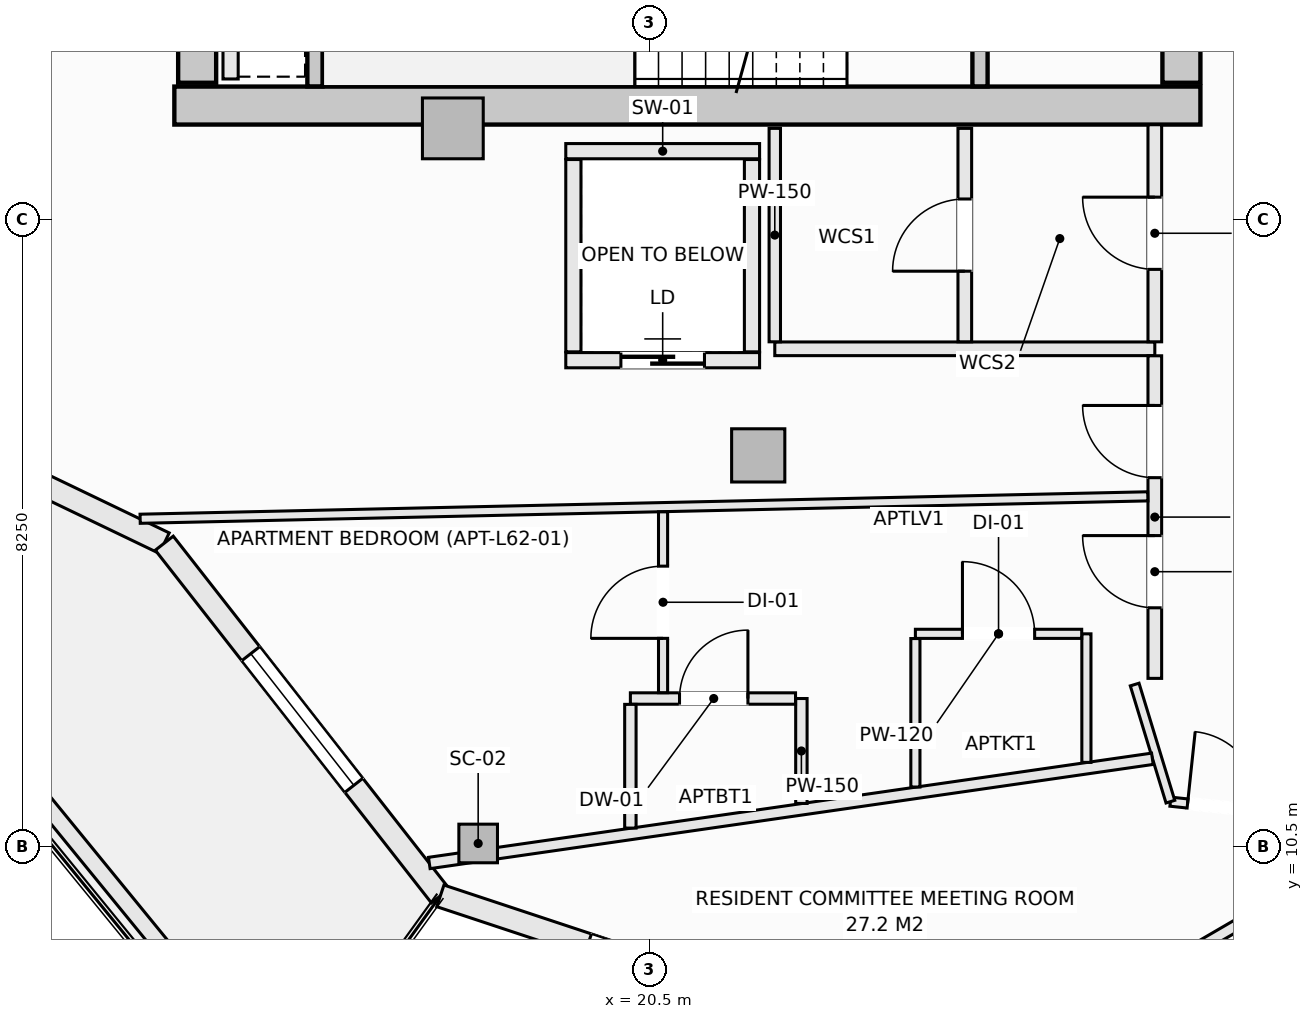
"""IFC4 building model, lengths in metres.
Left out: names, types, materials, properties, quantities, classifications, styles, units other than length and angle.
Written with IfcOpenShell. Run it as: python <this file> out.ifc"""

import sys

from ifc_helpers import new_model, si_unit, direction, frame, frame_2d, origin, origin_2d, place, context, subcontext, project, spatial, rectangle, hollow_rectangle, extrude, element, fill, save


model = new_model("IFC4")
c1 = context("Model", 3, precision=1e-05, world=origin(), true_north=direction((0.0, 1.0)))
c2 = subcontext(c1, "Body", "Model", "MODEL_VIEW")
j1 = project(units=[si_unit("LENGTHUNIT", "METRE"), si_unit("PLANEANGLEUNIT", "RADIAN")], contexts=[c1])
p1 = place(None, origin())
s1 = spatial("IfcSite", under=j1, at=p1, CompositionType="ELEMENT")
p2 = place(p1, origin())
s2 = spatial("IfcBuilding", under=s1, at=p2, CompositionType="ELEMENT")
p3 = place(p2, frame((0.0, 0.0, 232.7)))
s3 = spatial("IfcBuildingStorey", under=s2, at=p3, CompositionType="ELEMENT", Elevation=232.7)
p4 = place(p3, frame((14.25, 20.25, -0.27), z_axis=(0.0, 0.0, 1.0), x_axis=(1.0, 0.0, 0.0)))
e1 = element("IfcWall", 1, at=p4, inside=s3, PredefinedType="SHEAR", context=c2, shape_type="SweptSolid", body=[
    extrude(rectangle(XDim=13.5, YDim=0.5, at=frame_2d((6.75, 0.0))), origin(), (0.0, 0.0, 1.0), 3.3),
])
p5 = place(p3, frame((14.55, 20.55, -0.27), z_axis=(0.0, 0.0, 1.0), x_axis=(0.0, 1.0, 0.0)))
e2 = element("IfcWall", 2, at=p5, inside=s3, PredefinedType="SHEAR", context=c2, shape_type="SweptSolid", body=[
    extrude(rectangle(XDim=12.9, YDim=0.5, at=frame_2d((6.45, 0.0))), origin(), (0.0, 0.0, 1.0), 3.3),
])
p6 = place(p3, frame((27.5, 20.55, -0.27), z_axis=(0.0, 0.0, 1.0), x_axis=(0.0, 1.0, 0.0)))
e3 = element("IfcWall", 3, at=p6, inside=s3, PredefinedType="SHEAR", context=c2, shape_type="SweptSolid", body=[
    extrude(rectangle(XDim=1.5, YDim=0.5, at=frame_2d((0.75, 0.0))), origin(), (0.0, 0.0, 1.0), 3.3),
])
p7 = place(p3, frame((18.247, 10.542, -0.27), z_axis=(0.0, 0.0, 1.0), x_axis=(1.0, 0.0, 0.0)))
e4 = element("IfcColumn", 4, at=p7, inside=s3, PredefinedType="COLUMN", context=c2, shape_type="SweptSolid", body=[
    extrude(hollow_rectangle(XDim=0.508, YDim=0.508, WallThickness=0.019, at=origin_2d()), origin(), (0.0, 0.0, 1.0), 3.3),
])
p8 = place(p3, frame((21.932, 15.648, -0.27), z_axis=(0.0, 0.0, 1.0), x_axis=(1.0, 0.0, 0.0)))
e5 = element("IfcColumn", 5, at=p8, inside=s3, PredefinedType="COLUMN", context=c2, shape_type="SweptSolid", body=[
    extrude(rectangle(XDim=0.7, YDim=0.7, at=origin_2d()), origin(), (0.0, 0.0, 1.0), 3.3),
])
p9 = place(p3, frame((17.914, 19.95, -0.27), z_axis=(0.0, 0.0, 1.0), x_axis=(1.0, 0.0, 0.0)))
e6 = element("IfcColumn", 6, at=p9, inside=s3, PredefinedType="PILASTER", context=c2, shape_type="SweptSolid", body=[
    extrude(rectangle(XDim=0.8, YDim=0.8, at=origin_2d()), origin(), (0.0, 0.0, 1.0), 3.3),
])
p10 = place(p3, frame((8.691, 17.1, 0.0), z_axis=(0.0, 0.0, 1.0), x_axis=(0.901348331142, -0.433094892545, 0.0)))
e7 = element("IfcWall", 7, at=p10, inside=s3, PredefinedType="SOLIDWALL", context=c2, shape_type="SweptSolid", body=[
    extrude(rectangle(XDim=6.021, YDim=0.3, at=frame_2d((3.01, 0.0))), origin(), (0.0, 0.0, 1.0), 2.605),
])
p11 = place(p10, frame((2.11, 0.0, 0.0)))
e8 = element("IfcOpeningElement", 8, at=p11, cuts=e7, PredefinedType="OPENING", context=c2, shape_type="SweptSolid", body=[
    extrude(rectangle(XDim=1.8, YDim=2.25, at=frame_2d((0.9, 1.125))), frame((0.0, 0.16, 0.0), z_axis=(0.0, -1.0, 0.0), x_axis=(1.0, 0.0, 0.0)), (0.0, 0.0, 1.0), 0.32),
])
p12 = place(p3, frame((14.117, 14.493, 0.0), z_axis=(0.0, 0.0, 1.0), x_axis=(0.616450126935, -0.787393955401, 0.0)))
e9 = element("IfcWall", 9, at=p12, inside=s3, PredefinedType="SOLIDWALL", context=c2, shape_type="SweptSolid", body=[
    extrude(rectangle(XDim=5.893, YDim=0.3, at=frame_2d((2.946, 0.0))), origin(), (0.0, 0.0, 1.0), 2.605),
])
p13 = place(p12, frame((1.846, 0.0, 0.72)))
e10 = element("IfcOpeningElement", 10, at=p13, cuts=e9, PredefinedType="OPENING", context=c2, shape_type="SweptSolid", body=[
    extrude(rectangle(XDim=2.2, YDim=1.65, at=frame_2d((1.1, 0.825))), frame((0.0, 0.16, 0.0), z_axis=(0.0, -1.0, 0.0), x_axis=(1.0, 0.0, 0.0)), (0.0, 0.0, 1.0), 0.32),
])
p14 = place(p3, frame((17.75, 9.853, 0.0), z_axis=(0.0, 0.0, 1.0), x_axis=(0.949240877604, -0.314550085495, 0.0)))
e11 = element("IfcWall", 11, at=p14, inside=s3, PredefinedType="SOLIDWALL", context=c2, shape_type="SweptSolid", body=[
    extrude(rectangle(XDim=6.288, YDim=0.3, at=frame_2d((3.144, 0.0))), origin(), (0.0, 0.0, 1.0), 2.605),
])
p15 = place(p14, frame((2.044, 0.0, 0.72)))
e12 = element("IfcOpeningElement", 12, at=p15, cuts=e11, PredefinedType="OPENING", context=c2, shape_type="SweptSolid", body=[
    extrude(rectangle(XDim=2.2, YDim=1.65, at=frame_2d((1.1, 0.825))), frame((0.0, 0.16, 0.0), z_axis=(0.0, -1.0, 0.0), x_axis=(1.0, 0.0, 0.0)), (0.0, 0.0, 1.0), 0.32),
])
p16 = place(p3, frame((11.427, 12.441, 0.0), z_axis=(0.0, 0.0, 1.0), x_axis=(0.632697312147, -0.774399193699, 0.0)))
e13 = element("IfcWall", 13, at=p16, inside=s3, PredefinedType="PARAPET", context=c2, shape_type="SweptSolid", body=[
    extrude(rectangle(XDim=6.914, YDim=0.22, at=frame_2d((3.457, 0.0))), origin(), (0.0, 0.0, 1.0), 0.52),
])
p17 = place(p3, frame((24.85, 20.502, -0.27), z_axis=(0.0, 0.0, 1.0), x_axis=(0.0, 1.0, 0.0)))
e14 = element("IfcWall", 14, at=p17, inside=s3, PredefinedType="SHEAR", context=c2, shape_type="SweptSolid", body=[
    extrude(rectangle(XDim=3.038, YDim=0.2, at=frame_2d((1.519, 0.0))), origin(), (0.0, 0.0, 1.0), 3.3),
])
p18 = place(p17, frame((0.969, 0.0, 0.27)))
e15 = element("IfcOpeningElement", 15, at=p18, cuts=e14, PredefinedType="OPENING", context=c2, shape_type="SweptSolid", body=[
    extrude(rectangle(XDim=1.1, YDim=2.15, at=frame_2d((0.55, 1.075))), frame((0.0, 0.11, 0.0), z_axis=(0.0, -1.0, 0.0), x_axis=(1.0, 0.0, 0.0)), (0.0, 0.0, 1.0), 0.22),
])
p19 = place(p3, frame((16.1, 20.502, -0.27), z_axis=(0.0, 0.0, 1.0), x_axis=(0.0, 1.0, 0.0)))
e16 = element("IfcWall", 16, at=p19, inside=s3, PredefinedType="SHEAR", context=c2, shape_type="SweptSolid", body=[
    extrude(rectangle(XDim=3.036, YDim=0.2, at=frame_2d((1.518, 0.0))), origin(), (0.0, 0.0, 1.0), 3.3),
])
p20 = place(p3, frame((19.4, 19.65, 0.0), z_axis=(0.0, 0.0, 1.0), x_axis=(1.0, 0.0, 0.0)))
e17 = element("IfcWall", 17, at=p20, inside=s3, PredefinedType="SOLIDWALL", context=c2, shape_type="SweptSolid", body=[
    extrude(rectangle(XDim=2.55, YDim=0.2, at=frame_2d((1.275, 0.0))), origin(), (0.0, 0.0, 1.0), 3.03),
])
p21 = place(p3, frame((19.4, 16.9, 0.0), z_axis=(0.0, 0.0, 1.0), x_axis=(1.0, 0.0, 0.0)))
e18 = element("IfcWall", 18, at=p21, inside=s3, PredefinedType="SOLIDWALL", context=c2, shape_type="SweptSolid", body=[
    extrude(rectangle(XDim=2.55, YDim=0.2, at=frame_2d((1.275, 0.0))), origin(), (0.0, 0.0, 1.0), 3.03),
])
p22 = place(p21, frame((0.725, 0.0, 0.0)))
e19 = element("IfcOpeningElement", 19, at=p22, cuts=e18, PredefinedType="OPENING", context=c2, shape_type="SweptSolid", body=[
    extrude(rectangle(XDim=1.1, YDim=2.2, at=frame_2d((0.55, 1.1))), frame((0.0, 0.11, 0.0), z_axis=(0.0, -1.0, 0.0), x_axis=(1.0, 0.0, 0.0)), (0.0, 0.0, 1.0), 0.22),
])
for number, where, z_axis, x_axis in (
    (20, (19.5, 17.01, 0.0), (0.0, 0.0, 1.0), (0.0, 1.0, 0.0)),
    (21, (21.85, 17.01, 0.0), (0.0, 0.0, 1.0), (0.0, 1.0, 0.0)),
):
    element("IfcWall", number, at=place(p3, frame(where, z_axis=z_axis, x_axis=x_axis)), inside=s3, PredefinedType="SOLIDWALL", context=c2, shape_type="SweptSolid", body=[
        extrude(rectangle(XDim=2.53, YDim=0.2, at=frame_2d((1.265, 0.0))), origin(), (0.0, 0.0, 1.0), 3.03),
    ])
p23 = place(p3, frame((14.99, 20.6, 0.0), z_axis=(0.0, 0.0, 1.0), x_axis=(0.0, 1.0, 0.0)))
e22 = element("IfcWall", 22, at=p23, inside=s3, PredefinedType="SOLIDWALL", context=c2, shape_type="SweptSolid", body=[
    extrude(rectangle(XDim=2.85, YDim=0.2, at=frame_2d((1.425, 0.0))), origin(), (0.0, 0.0, 1.0), 3.03),
])
p24 = place(p3, frame((22.15, 17.05, 0.0), z_axis=(0.0, 0.0, 1.0), x_axis=(1.0, 0.0, 0.0)))
e23 = element("IfcWall", 23, at=p24, inside=s3, PredefinedType="SOLIDWALL", context=c2, shape_type="SweptSolid", body=[
    extrude(rectangle(XDim=5.0, YDim=0.18, at=frame_2d((2.5, 0.0))), origin(), (0.0, 0.0, 1.0), 3.03),
])
p25 = place(p3, frame((22.15, 17.142, 0.0), z_axis=(0.0, 0.0, 1.0), x_axis=(0.0, 1.0, 0.0)))
e24 = element("IfcWall", 24, at=p25, inside=s3, PredefinedType="PARTITIONING", context=c2, shape_type="SweptSolid", body=[
    extrude(rectangle(XDim=2.808, YDim=0.15, at=frame_2d((1.404, 0.0))), origin(), (0.0, 0.0, 1.0), 3.03),
])
p26 = place(p3, frame((24.65, 17.142, 0.0), z_axis=(0.0, 0.0, 1.0), x_axis=(0.0, 1.0, 0.0)))
e25 = element("IfcWall", 25, at=p26, inside=s3, PredefinedType="SOLIDWALL", context=c2, shape_type="SweptSolid", body=[
    extrude(rectangle(XDim=2.808, YDim=0.18, at=frame_2d((1.404, 0.0))), origin(), (0.0, 0.0, 1.0), 3.03),
])
p27 = place(p26, frame((0.929, 0.0, 0.0)))
e26 = element("IfcOpeningElement", 26, at=p27, cuts=e25, PredefinedType="OPENING", context=c2, shape_type="SweptSolid", body=[
    extrude(rectangle(XDim=0.95, YDim=2.1, at=frame_2d((0.475, 1.05))), frame((0.0, 0.1, 0.0), z_axis=(0.0, -1.0, 0.0), x_axis=(1.0, 0.0, 0.0)), (0.0, 0.0, 1.0), 0.2),
])
p28 = place(p3, frame((27.15, 12.714, 0.0), z_axis=(0.0, 0.0, 1.0), x_axis=(0.0, 1.0, 0.0)))
e27 = element("IfcWall", 27, at=p28, inside=s3, PredefinedType="SOLIDWALL", context=c2, shape_type="SweptSolid", body=[
    extrude(rectangle(XDim=4.244, YDim=0.18, at=frame_2d((2.122, 0.0))), origin(), (0.0, 0.0, 1.0), 3.03),
])
p29 = place(p28, frame((0.928, 0.0, 0.0)))
e28 = element("IfcOpeningElement", 28, at=p29, cuts=e27, PredefinedType="OPENING", context=c2, shape_type="SweptSolid", body=[
    extrude(rectangle(XDim=0.95, YDim=2.1, at=frame_2d((0.475, 1.05))), frame((0.0, 0.1, 0.0), z_axis=(0.0, -1.0, 0.0), x_axis=(1.0, 0.0, 0.0)), (0.0, 0.0, 1.0), 0.2),
])
p30 = place(p28, frame((2.64, 0.0, 0.0)))
e29 = element("IfcOpeningElement", 29, at=p30, cuts=e27, PredefinedType="OPENING", context=c2, shape_type="SweptSolid", body=[
    extrude(rectangle(XDim=0.95, YDim=2.1, at=frame_2d((0.475, 1.05))), frame((0.0, 0.1, 0.0), z_axis=(0.0, -1.0, 0.0), x_axis=(1.0, 0.0, 0.0)), (0.0, 0.0, 1.0), 0.2),
])
p31 = place(p3, frame((27.15, 17.142, 0.0), z_axis=(0.0, 0.0, 1.0), x_axis=(0.0, 1.0, 0.0)))
e30 = element("IfcWall", 30, at=p31, inside=s3, PredefinedType="SOLIDWALL", context=c2, shape_type="SweptSolid", body=[
    extrude(rectangle(XDim=2.856, YDim=0.18, at=frame_2d((1.428, 0.0))), origin(), (0.0, 0.0, 1.0), 3.03),
])
p32 = place(p31, frame((0.953, 0.0, 0.0)))
e31 = element("IfcOpeningElement", 31, at=p32, cuts=e30, PredefinedType="OPENING", context=c2, shape_type="SweptSolid", body=[
    extrude(rectangle(XDim=0.95, YDim=2.1, at=frame_2d((0.475, 1.05))), frame((0.0, 0.1, 0.0), z_axis=(0.0, -1.0, 0.0), x_axis=(1.0, 0.0, 0.0)), (0.0, 0.0, 1.0), 0.2),
])
p33 = place(p3, frame((27.355, 11.092, 0.0), z_axis=(0.0, 0.0, 1.0), x_axis=(0.994438591301, -0.105318033263, 0.0)))
e32 = element("IfcWall", 32, at=p33, inside=s3, PredefinedType="PARTITIONING", context=c2, shape_type="SweptSolid", body=[
    extrude(rectangle(XDim=1.405, YDim=0.12, at=frame_2d((0.702, 0.0))), origin(), (0.0, 0.0, 1.0), 3.03),
])
p34 = place(p33, frame((0.227, 0.0, 0.0)))
e33 = element("IfcOpeningElement", 33, at=p34, cuts=e32, PredefinedType="OPENING", context=c2, shape_type="SweptSolid", body=[
    extrude(rectangle(XDim=0.95, YDim=2.1, at=frame_2d((0.475, 1.05))), frame((0.0, 0.07, 0.0), z_axis=(0.0, -1.0, 0.0), x_axis=(1.0, 0.0, 0.0)), (0.0, 0.0, 1.0), 0.14),
])
p35 = place(p3, frame((26.885, 12.633, 0.0), z_axis=(0.0, 0.0, 1.0), x_axis=(0.291710302586, -0.956506716843, 0.0)))
e34 = element("IfcWall", 34, at=p35, inside=s3, PredefinedType="PARTITIONING", context=c2, shape_type="SweptSolid", body=[
    extrude(rectangle(XDim=1.611, YDim=0.12, at=frame_2d((0.806, 0.0))), origin(), (0.0, 0.0, 1.0), 3.03),
])
p36 = place(p3, frame((13.8, 14.814, 0.0), z_axis=(0.0, 0.0, 1.0), x_axis=(0.999752677802, 0.022239227231, 0.0)))
e35 = element("IfcWall", 35, at=p36, inside=s3, PredefinedType="PARTITIONING", context=c2, shape_type="SweptSolid", body=[
    extrude(rectangle(XDim=13.261, YDim=0.12, at=frame_2d((6.631, 0.0))), origin(), (0.0, 0.0, 1.0), 2.478),
])
p37 = place(p3, frame((17.604, 10.285, 0.0), z_axis=(0.0, 0.0, 1.0), x_axis=(0.989781675617, 0.142591144933, 0.0)))
e36 = element("IfcWall", 36, at=p37, inside=s3, PredefinedType="PARTITIONING", context=c2, shape_type="SweptSolid", body=[
    extrude(rectangle(XDim=9.612, YDim=0.15, at=frame_2d((4.806, 0.0))), origin(), (0.0, 0.0, 1.0), 2.605),
])
p38 = place(p3, frame((26.25, 11.609, 0.0), z_axis=(0.0, 0.0, 1.0), x_axis=(0.0, 1.0, 0.0)))
e37 = element("IfcWall", 37, at=p38, inside=s3, PredefinedType="PARTITIONING", context=c2, shape_type="SweptSolid", body=[
    extrude(rectangle(XDim=1.691, YDim=0.12, at=frame_2d((0.846, 0.0))), origin(), (0.0, 0.0, 1.0), 3.03),
])
p39 = place(p3, frame((24.0, 13.3, 0.0), z_axis=(0.0, 0.0, 1.0), x_axis=(1.0, 0.0, 0.0)))
e38 = element("IfcWall", 38, at=p39, inside=s3, PredefinedType="PARTITIONING", context=c2, shape_type="SweptSolid", body=[
    extrude(rectangle(XDim=2.188, YDim=0.12, at=frame_2d((1.094, 0.0))), origin(), (0.0, 0.0, 1.0), 3.03),
])
p40 = place(p39, frame((0.619, 0.0, 0.0)))
e39 = element("IfcOpeningElement", 39, at=p40, cuts=e38, PredefinedType="OPENING", context=c2, shape_type="SweptSolid", body=[
    extrude(rectangle(XDim=0.95, YDim=2.1, at=frame_2d((0.475, 1.05))), frame((0.0, 0.07, 0.0), z_axis=(0.0, -1.0, 0.0), x_axis=(1.0, 0.0, 0.0)), (0.0, 0.0, 1.0), 0.14),
])
p41 = place(p3, frame((24.0, 11.285, 0.0), z_axis=(0.0, 0.0, 1.0), x_axis=(0.0, 1.0, 0.0)))
e40 = element("IfcWall", 40, at=p41, inside=s3, PredefinedType="PARTITIONING", context=c2, shape_type="SweptSolid", body=[
    extrude(rectangle(XDim=1.953, YDim=0.12, at=frame_2d((0.977, 0.0))), origin(), (0.0, 0.0, 1.0), 3.03),
])
p42 = place(p3, frame((22.5, 11.069, 0.0), z_axis=(0.0, 0.0, 1.0), x_axis=(0.0, 1.0, 0.0)))
e41 = element("IfcWall", 41, at=p42, inside=s3, PredefinedType="PARTITIONING", context=c2, shape_type="SweptSolid", body=[
    extrude(rectangle(XDim=1.38, YDim=0.15, at=frame_2d((0.69, 0.0))), origin(), (0.0, 0.0, 1.0), 3.03),
])
p43 = place(p3, frame((20.25, 12.449, 0.0), z_axis=(0.0, 0.0, 1.0), x_axis=(1.0, 0.0, 0.0)))
e42 = element("IfcWall", 42, at=p43, inside=s3, PredefinedType="PARTITIONING", context=c2, shape_type="SweptSolid", body=[
    extrude(rectangle(XDim=2.173, YDim=0.15, at=frame_2d((1.086, 0.0))), origin(), (0.0, 0.0, 1.0), 3.03),
])
p44 = place(p43, frame((0.646, 0.0, 0.0)))
e43 = element("IfcOpeningElement", 43, at=p44, cuts=e42, PredefinedType="OPENING", context=c2, shape_type="SweptSolid", body=[
    extrude(rectangle(XDim=0.9, YDim=2.1, at=frame_2d((0.45, 1.05))), frame((0.0, 0.085, 0.0), z_axis=(0.0, -1.0, 0.0), x_axis=(1.0, 0.0, 0.0)), (0.0, 0.0, 1.0), 0.17),
])
p45 = place(p3, frame((20.68, 12.526, 0.0), z_axis=(0.0, 0.0, 1.0), x_axis=(0.0, 1.0, 0.0)))
e44 = element("IfcWall", 44, at=p45, inside=s3, PredefinedType="PARTITIONING", context=c2, shape_type="SweptSolid", body=[
    extrude(rectangle(XDim=2.379, YDim=0.12, at=frame_2d((1.189, 0.0))), origin(), (0.0, 0.0, 1.0), 2.478),
])
p46 = place(p45, frame((0.715, 0.0, 0.0)))
e45 = element("IfcOpeningElement", 45, at=p46, cuts=e44, PredefinedType="OPENING", context=c2, shape_type="SweptSolid", body=[
    extrude(rectangle(XDim=0.95, YDim=2.1, at=frame_2d((0.475, 1.05))), frame((0.0, 0.07, 0.0), z_axis=(0.0, -1.0, 0.0), x_axis=(1.0, 0.0, 0.0)), (0.0, 0.0, 1.0), 0.14),
])
p47 = place(p3, frame((20.25, 10.744, 0.0), z_axis=(0.0, 0.0, 1.0), x_axis=(0.0, 1.0, 0.0)))
e46 = element("IfcWall", 46, at=p47, inside=s3, PredefinedType="PARTITIONING", context=c2, shape_type="SweptSolid", body=[
    extrude(rectangle(XDim=1.628, YDim=0.15, at=frame_2d((0.814, 0.0))), origin(), (0.0, 0.0, 1.0), 3.03),
])
p48 = place(p3, frame((25.447, 7.846, 0.0), z_axis=(0.0, 0.0, 1.0), x_axis=(0.864278106544, 0.503014268732, 0.0)))
e47 = element("IfcWall", 47, at=p48, inside=s3, PredefinedType="PARTITIONING", context=c2, shape_type="SweptSolid", body=[
    extrude(rectangle(XDim=7.638, YDim=0.15, at=frame_2d((3.819, 0.0))), origin(), (0.0, 0.0, 1.0), 3.03),
])
p49 = place(p13, origin())
e48 = element("IfcWindow", 48, at=p49, inside=s3, PartitioningType="SINGLE_PANEL", PredefinedType="WINDOW", context=c2, shape_type="SweptSolid", body=[
    extrude(rectangle(XDim=2.2, YDim=1.65, at=frame_2d((1.1, 0.825))), frame((0.0, 0.03, 0.0), z_axis=(0.0, -1.0, 0.0), x_axis=(1.0, 0.0, 0.0)), (0.0, 0.0, 1.0), 0.06),
])
fill(e10, e48)
p50 = place(p22, origin())
e49 = element("IfcDoor", 49, at=p50, inside=s3, OperationType="SLIDING_TO_LEFT", PredefinedType="DOOR", context=c2, shape_type="SweptSolid", body=[
    extrude(rectangle(XDim=1.1, YDim=2.2, at=frame_2d((0.55, 1.1))), frame((0.0, 0.025, 0.0), z_axis=(0.0, -1.0, 0.0), x_axis=(1.0, 0.0, 0.0)), (0.0, 0.0, 1.0), 0.05),
])
fill(e19, e49)
p51 = place(p32, origin())
e50 = element("IfcDoor", 50, at=p51, inside=s3, OperationType="SINGLE_SWING_RIGHT", PredefinedType="DOOR", context=c2, shape_type="SweptSolid", body=[
    extrude(rectangle(XDim=0.95, YDim=2.1, at=frame_2d((0.475, 1.05))), frame((0.0, 0.025, 0.0), z_axis=(0.0, -1.0, 0.0), x_axis=(1.0, 0.0, 0.0)), (0.0, 0.0, 1.0), 0.05),
])
fill(e31, e50)
p52 = place(p29, origin())
e51 = element("IfcDoor", 51, at=p52, inside=s3, OperationType="SINGLE_SWING_RIGHT", PredefinedType="DOOR", context=c2, shape_type="SweptSolid", body=[
    extrude(rectangle(XDim=0.95, YDim=2.1, at=frame_2d((0.475, 1.05))), frame((0.0, 0.025, 0.0), z_axis=(0.0, -1.0, 0.0), x_axis=(1.0, 0.0, 0.0)), (0.0, 0.0, 1.0), 0.05),
])
fill(e28, e51)
p53 = place(p34, origin())
e52 = element("IfcDoor", 52, at=p53, inside=s3, OperationType="SINGLE_SWING_LEFT", PredefinedType="DOOR", context=c2, shape_type="SweptSolid", body=[
    extrude(rectangle(XDim=0.95, YDim=2.1, at=frame_2d((0.475, 1.05))), frame((0.0, 0.025, 0.0), z_axis=(0.0, -1.0, 0.0), x_axis=(1.0, 0.0, 0.0)), (0.0, 0.0, 1.0), 0.05),
])
fill(e33, e52)
p54 = place(p30, origin())
e53 = element("IfcDoor", 53, at=p54, inside=s3, OperationType="SINGLE_SWING_RIGHT", PredefinedType="DOOR", context=c2, shape_type="SweptSolid", body=[
    extrude(rectangle(XDim=0.95, YDim=2.1, at=frame_2d((0.475, 1.05))), frame((0.0, 0.025, 0.0), z_axis=(0.0, -1.0, 0.0), x_axis=(1.0, 0.0, 0.0)), (0.0, 0.0, 1.0), 0.05),
])
fill(e29, e53)
p55 = place(p40, origin())
e54 = element("IfcDoor", 54, at=p55, inside=s3, OperationType="SINGLE_SWING_LEFT", PredefinedType="DOOR", context=c2, shape_type="SweptSolid", body=[
    extrude(rectangle(XDim=0.95, YDim=2.1, at=frame_2d((0.475, 1.05))), frame((0.0, 0.025, 0.0), z_axis=(0.0, -1.0, 0.0), x_axis=(1.0, 0.0, 0.0)), (0.0, 0.0, 1.0), 0.05),
])
fill(e39, e54)
p56 = place(p44, origin())
e55 = element("IfcDoor", 55, at=p56, inside=s3, OperationType="SINGLE_SWING_RIGHT", PredefinedType="DOOR", context=c2, shape_type="SweptSolid", body=[
    extrude(rectangle(XDim=0.9, YDim=2.1, at=frame_2d((0.45, 1.05))), frame((0.0, 0.025, 0.0), z_axis=(0.0, -1.0, 0.0), x_axis=(1.0, 0.0, 0.0)), (0.0, 0.0, 1.0), 0.05),
])
fill(e43, e55)
p57 = place(p46, origin())
e56 = element("IfcDoor", 56, at=p57, inside=s3, OperationType="SINGLE_SWING_LEFT", PredefinedType="DOOR", context=c2, shape_type="SweptSolid", body=[
    extrude(rectangle(XDim=0.95, YDim=2.1, at=frame_2d((0.475, 1.05))), frame((0.0, 0.025, 0.0), z_axis=(0.0, -1.0, 0.0), x_axis=(1.0, 0.0, 0.0)), (0.0, 0.0, 1.0), 0.05),
])
fill(e45, e56)
p58 = place(p27, origin())
e57 = element("IfcDoor", 57, at=p58, inside=s3, OperationType="SINGLE_SWING_LEFT", PredefinedType="DOOR", context=c2, shape_type="SweptSolid", body=[
    extrude(rectangle(XDim=0.95, YDim=2.1, at=frame_2d((0.475, 1.05))), frame((0.0, 0.025, 0.0), z_axis=(0.0, -1.0, 0.0), x_axis=(1.0, 0.0, 0.0)), (0.0, 0.0, 1.0), 0.05),
])
fill(e26, e57)
save(model, sys.argv[1])
